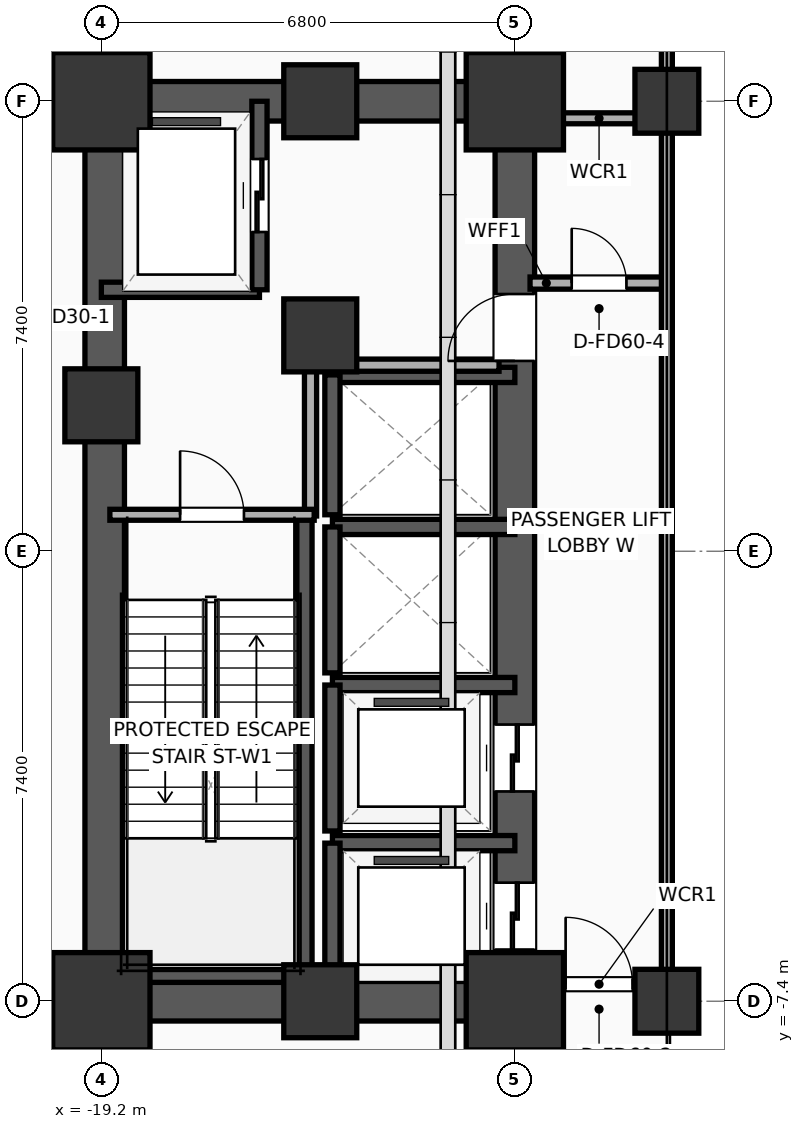
"""IFC4 building model, lengths in metres.
Left out: names, types, materials, properties, quantities, classifications, styles, units other than length and angle.
Written with IfcOpenShell. Run it as: python <this file> out.ifc"""

import sys

from ifc_helpers import new_model, si_unit, direction, frame, frame_2d, origin, origin_2d, place, context, subcontext, project, spatial, rectangle, extrude, element, fill, save


model = new_model("IFC4")
c1 = context("Model", 3, precision=1e-05, world=origin(), true_north=direction((0.0, 1.0)))
c2 = subcontext(c1, "Body", "Model", "MODEL_VIEW")
j1 = project(units=[si_unit("LENGTHUNIT", "METRE"), si_unit("PLANEANGLEUNIT", "RADIAN")], contexts=[c1])
p1 = place(None, origin())
s1 = spatial("IfcSite", under=j1, at=p1, CompositionType="ELEMENT")
p2 = place(p1, origin())
s2 = spatial("IfcBuilding", under=s1, at=p2, CompositionType="ELEMENT")
p3 = place(p2, frame((0.0, 0.0, 10.4)))
s3 = spatial("IfcBuildingStorey", under=s2, at=p3, CompositionType="ELEMENT", Elevation=10.4)
p4 = place(p3, frame((-19.2, -7.4, 0.0), z_axis=(0.0, 0.0, 1.0), x_axis=(1.0, 0.0, 0.0)))
e1 = element("IfcColumn", 1, at=p4, inside=s3, PredefinedType="COLUMN", context=c2, shape_type="SweptSolid", body=[
    extrude(rectangle(XDim=1.6, YDim=1.6, at=origin_2d()), origin(), (0.0, 0.0, 1.0), 5.2),
])
p5 = place(p3, frame((-19.2, 2.4, 0.0), z_axis=(0.0, 0.0, 1.0), x_axis=(1.0, 0.0, 0.0)))
e2 = element("IfcColumn", 2, at=p5, inside=s3, PredefinedType="COLUMN", context=c2, shape_type="SweptSolid", body=[
    extrude(rectangle(XDim=1.2, YDim=1.2, at=origin_2d()), origin(), (0.0, 0.0, 1.0), 5.2),
])
p6 = place(p3, frame((-19.2, 7.4, 0.0), z_axis=(0.0, 0.0, 1.0), x_axis=(1.0, 0.0, 0.0)))
e3 = element("IfcColumn", 3, at=p6, inside=s3, PredefinedType="COLUMN", context=c2, shape_type="SweptSolid", body=[
    extrude(rectangle(XDim=1.6, YDim=1.6, at=origin_2d()), origin(), (0.0, 0.0, 1.0), 5.2),
])
for number, where, z_axis, x_axis in (
    (4, (-15.6, -7.4, 0.0), (0.0, 0.0, 1.0), (1.0, 0.0, 0.0)),
    (5, (-15.6, 7.4, 0.0), (0.0, 0.0, 1.0), (1.0, 0.0, 0.0)),
):
    element("IfcColumn", number, at=place(p3, frame(where, z_axis=z_axis, x_axis=x_axis)), inside=s3, PredefinedType="COLUMN", context=c2, shape_type="SweptSolid", body=[
        extrude(rectangle(XDim=1.2, YDim=1.2, at=origin_2d()), origin(), (0.0, 0.0, 1.0), 5.2),
    ])
p7 = place(p3, frame((-12.4, -7.4, 0.0), z_axis=(0.0, 0.0, 1.0), x_axis=(1.0, 0.0, 0.0)))
e6 = element("IfcColumn", 6, at=p7, inside=s3, PredefinedType="COLUMN", context=c2, shape_type="SweptSolid", body=[
    extrude(rectangle(XDim=1.6, YDim=1.6, at=origin_2d()), origin(), (0.0, 0.0, 1.0), 5.2),
])
p8 = place(p3, frame((-15.6, 3.55, 0.0), z_axis=(0.0, 0.0, 1.0), x_axis=(1.0, 0.0, 0.0)))
e7 = element("IfcColumn", 7, at=p8, inside=s3, PredefinedType="COLUMN", context=c2, shape_type="SweptSolid", body=[
    extrude(rectangle(XDim=1.2, YDim=1.2, at=origin_2d()), origin(), (0.0, 0.0, 1.0), 5.2),
])
p9 = place(p3, frame((-12.4, 7.4, 0.0), z_axis=(0.0, 0.0, 1.0), x_axis=(1.0, 0.0, 0.0)))
e8 = element("IfcColumn", 8, at=p9, inside=s3, PredefinedType="COLUMN", context=c2, shape_type="SweptSolid", body=[
    extrude(rectangle(XDim=1.6, YDim=1.6, at=origin_2d()), origin(), (0.0, 0.0, 1.0), 5.2),
])
for number, where, z_axis, x_axis in (
    (9, (-19.525, -7.4, 0.0), (0.0, 0.0, 1.0), (1.0, 0.0, 0.0)),
    (10, (-19.525, 7.4, 0.0), (0.0, 0.0, 1.0), (1.0, 0.0, 0.0)),
):
    element("IfcWall", number, at=place(p3, frame(where, z_axis=z_axis, x_axis=x_axis)), inside=s3, PredefinedType="SHEAR", context=c2, shape_type="SweptSolid", body=[
        extrude(rectangle(XDim=7.45, YDim=0.65, at=frame_2d((3.725, 0.0))), origin(), (0.0, 0.0, 1.0), 4.92),
    ])
p10 = place(p3, frame((-19.145, -7.4, 0.0), z_axis=(0.0, 0.0, 1.0), x_axis=(0.0, 1.0, 0.0)))
e11 = element("IfcWall", 11, at=p10, inside=s3, PredefinedType="SHEAR", context=c2, shape_type="SweptSolid", body=[
    extrude(rectangle(XDim=14.8, YDim=0.65, at=frame_2d((7.4, 0.0))), origin(), (0.0, 0.0, 1.0), 4.92),
])
p11 = place(p3, frame((-12.4, -7.4, 0.0), z_axis=(0.0, 0.0, 1.0), x_axis=(0.0, 1.0, 0.0)))
e12 = element("IfcWall", 12, at=p11, inside=s3, PredefinedType="SHEAR", context=c2, shape_type="SweptSolid", body=[
    extrude(rectangle(XDim=14.8, YDim=0.65, at=frame_2d((7.4, 0.0))), origin(), (0.0, 0.0, 1.0), 4.92),
])
p12 = place(p11, frame((0.85, 0.0, 0.0)))
e13 = element("IfcOpeningElement", 13, at=p12, cuts=e12, PredefinedType="OPENING", context=c2, shape_type="SweptSolid", body=[
    extrude(rectangle(XDim=1.1, YDim=2.05, at=frame_2d((0.55, 1.025))), frame((0.0, 0.335, 0.0), z_axis=(0.0, -1.0, 0.0), x_axis=(1.0, 0.0, 0.0)), (0.0, 0.0, 1.0), 0.67),
])
p13 = place(p11, frame((3.45, 0.0, 0.0)))
e14 = element("IfcOpeningElement", 14, at=p13, cuts=e12, PredefinedType="OPENING", context=c2, shape_type="SweptSolid", body=[
    extrude(rectangle(XDim=1.1, YDim=2.05, at=frame_2d((0.55, 1.025))), frame((0.0, 0.335, 0.0), z_axis=(0.0, -1.0, 0.0), x_axis=(1.0, 0.0, 0.0)), (0.0, 0.0, 1.0), 0.67),
])
p14 = place(p11, frame((10.53, 0.0, 0.0)))
e15 = element("IfcOpeningElement", 15, at=p14, cuts=e12, PredefinedType="OPENING", context=c2, shape_type="SweptSolid", body=[
    extrude(rectangle(XDim=1.1, YDim=2.05, at=frame_2d((0.55, 1.025))), frame((0.0, 0.335, 0.0), z_axis=(0.0, -1.0, 0.0), x_axis=(1.0, 0.0, 0.0)), (0.0, 0.0, 1.0), 0.67),
])
p15 = place(p3, frame((-15.86, -7.085, 0.0), z_axis=(0.0, 0.0, 1.0), x_axis=(0.0, 1.0, 0.0)))
e16 = element("IfcWall", 16, at=p15, inside=s3, PredefinedType="SOLIDWALL", context=c2, shape_type="SweptSolid", body=[
    extrude(rectangle(XDim=7.685, YDim=0.25, at=frame_2d((3.843, 0.0))), origin(), (0.0, 0.0, 1.0), 4.92),
])
p16 = place(p3, frame((-19.2, -6.965, 0.0), z_axis=(0.0, 0.0, 1.0), x_axis=(1.0, 0.0, 0.0)))
e17 = element("IfcWall", 17, at=p16, inside=s3, PredefinedType="SOLIDWALL", context=c2, shape_type="SweptSolid", body=[
    extrude(rectangle(XDim=3.46, YDim=0.25, at=frame_2d((1.73, 0.0))), origin(), (0.0, 0.0, 1.0), 4.92),
])
for number, where, z_axis, x_axis in (
    (18, (-9.9, -7.4, 0.0), (0.0, 0.0, 1.0), (1.0, 0.0, 0.0)),
    (19, (-9.9, 7.4, 0.0), (0.0, 0.0, 1.0), (1.0, 0.0, 0.0)),
):
    element("IfcColumn", number, at=place(p3, frame(where, z_axis=z_axis, x_axis=x_axis)), inside=s3, PredefinedType="COLUMN", context=c2, shape_type="SweptSolid", body=[
        extrude(rectangle(XDim=1.05, YDim=1.05, at=origin_2d()), origin(), (0.0, 0.0, 1.0), 5.2),
    ])
p17 = place(p3, frame((-19.2, 4.3, 0.0), z_axis=(0.0, 0.0, 1.0), x_axis=(1.0, 0.0, 0.0)))
e20 = element("IfcWall", 20, at=p17, inside=s3, PredefinedType="SOLIDWALL", context=c2, shape_type="SweptSolid", body=[
    extrude(rectangle(XDim=2.6, YDim=0.25, at=frame_2d((1.3, 0.0))), origin(), (0.0, 0.0, 1.0), 4.92),
])
p18 = place(p3, frame((-16.6, 4.3, 0.0), z_axis=(0.0, 0.0, 1.0), x_axis=(0.0, 1.0, 0.0)))
e21 = element("IfcWall", 21, at=p18, inside=s3, PredefinedType="SOLIDWALL", context=c2, shape_type="SweptSolid", body=[
    extrude(rectangle(XDim=3.1, YDim=0.25, at=frame_2d((1.55, 0.0))), origin(), (0.0, 0.0, 1.0), 4.92),
])
p19 = place(p18, frame((0.95, 0.0, 0.0)))
e22 = element("IfcOpeningElement", 22, at=p19, cuts=e21, PredefinedType="OPENING", context=c2, shape_type="SweptSolid", body=[
    extrude(rectangle(XDim=1.2, YDim=2.05, at=frame_2d((0.6, 1.025))), frame((0.0, 0.135, 0.0), z_axis=(0.0, -1.0, 0.0), x_axis=(1.0, 0.0, 0.0)), (0.0, 0.0, 1.0), 0.27),
])
p20 = place(p3, frame((-12.4, -4.8, 0.0), z_axis=(0.0, 0.0, 1.0), x_axis=(-1.0, 0.0, 0.0)))
e23 = element("IfcWall", 23, at=p20, inside=s3, PredefinedType="SOLIDWALL", context=c2, shape_type="SweptSolid", body=[
    extrude(rectangle(XDim=3.0, YDim=0.25, at=frame_2d((1.5, 0.0))), origin(), (0.0, 0.0, 1.0), 4.92),
])
p21 = place(p3, frame((-15.4, -4.8, 0.0), z_axis=(0.0, 0.0, 1.0), x_axis=(0.0, -1.0, 0.0)))
e24 = element("IfcWall", 24, at=p21, inside=s3, PredefinedType="SOLIDWALL", context=c2, shape_type="SweptSolid", body=[
    extrude(rectangle(XDim=2.6, YDim=0.25, at=frame_2d((1.3, 0.0))), origin(), (0.0, 0.0, 1.0), 4.92),
])
p22 = place(p3, frame((-12.4, -2.2, 0.0), z_axis=(0.0, 0.0, 1.0), x_axis=(-1.0, 0.0, 0.0)))
e25 = element("IfcWall", 25, at=p22, inside=s3, PredefinedType="SOLIDWALL", context=c2, shape_type="SweptSolid", body=[
    extrude(rectangle(XDim=3.0, YDim=0.25, at=frame_2d((1.5, 0.0))), origin(), (0.0, 0.0, 1.0), 4.92),
])
p23 = place(p3, frame((-15.4, -2.2, 0.0), z_axis=(0.0, 0.0, 1.0), x_axis=(0.0, -1.0, 0.0)))
e26 = element("IfcWall", 26, at=p23, inside=s3, PredefinedType="SOLIDWALL", context=c2, shape_type="SweptSolid", body=[
    extrude(rectangle(XDim=2.4, YDim=0.25, at=frame_2d((1.2, 0.0))), origin(), (0.0, 0.0, 1.0), 4.92),
])
p24 = place(p3, frame((-12.4, 0.4, 0.0), z_axis=(0.0, 0.0, 1.0), x_axis=(-1.0, 0.0, 0.0)))
e27 = element("IfcWall", 27, at=p24, inside=s3, PredefinedType="SOLIDWALL", context=c2, shape_type="SweptSolid", body=[
    extrude(rectangle(XDim=3.0, YDim=0.25, at=frame_2d((1.5, 0.0))), origin(), (0.0, 0.0, 1.0), 4.92),
])
p25 = place(p3, frame((-15.4, 0.4, 0.0), z_axis=(0.0, 0.0, 1.0), x_axis=(0.0, -1.0, 0.0)))
e28 = element("IfcWall", 28, at=p25, inside=s3, PredefinedType="SOLIDWALL", context=c2, shape_type="SweptSolid", body=[
    extrude(rectangle(XDim=2.4, YDim=0.25, at=frame_2d((1.2, 0.0))), origin(), (0.0, 0.0, 1.0), 4.92),
])
p26 = place(p3, frame((-12.4, 2.9, 0.0), z_axis=(0.0, 0.0, 1.0), x_axis=(-1.0, 0.0, 0.0)))
e29 = element("IfcWall", 29, at=p26, inside=s3, PredefinedType="SOLIDWALL", context=c2, shape_type="SweptSolid", body=[
    extrude(rectangle(XDim=3.0, YDim=0.25, at=frame_2d((1.5, 0.0))), origin(), (0.0, 0.0, 1.0), 4.92),
])
p27 = place(p3, frame((-15.4, 2.9, 0.0), z_axis=(0.0, 0.0, 1.0), x_axis=(0.0, -1.0, 0.0)))
e30 = element("IfcWall", 30, at=p27, inside=s3, PredefinedType="SOLIDWALL", context=c2, shape_type="SweptSolid", body=[
    extrude(rectangle(XDim=2.3, YDim=0.25, at=frame_2d((1.15, 0.0))), origin(), (0.0, 0.0, 1.0), 4.92),
])
p28 = place(p3, frame((-15.76, 0.58, 0.0), z_axis=(0.0, 0.0, 1.0), x_axis=(0.0, 1.0, 0.0)))
e31 = element("IfcWall", 31, at=p28, inside=s3, PredefinedType="PARTITIONING", context=c2, shape_type="SweptSolid", body=[
    extrude(rectangle(XDim=2.52, YDim=0.2, at=frame_2d((1.26, 0.0))), origin(), (0.0, 0.0, 1.0), 4.92),
])
p29 = place(p3, frame((-15.82, 3.06, 0.0), z_axis=(0.0, 0.0, 1.0), x_axis=(1.0, 0.0, 0.0)))
e32 = element("IfcWall", 32, at=p29, inside=s3, PredefinedType="PARTITIONING", context=c2, shape_type="SweptSolid", body=[
    extrude(rectangle(XDim=3.16, YDim=0.2, at=frame_2d((1.58, 0.0))), origin(), (0.0, 0.0, 1.0), 4.92),
])
p30 = place(p3, frame((-19.06, 0.6, 0.0), z_axis=(0.0, 0.0, 1.0), x_axis=(1.0, 0.0, 0.0)))
e33 = element("IfcWall", 33, at=p30, inside=s3, PredefinedType="PARTITIONING", context=c2, shape_type="SweptSolid", body=[
    extrude(rectangle(XDim=3.36, YDim=0.18, at=frame_2d((1.68, 0.0))), origin(), (0.0, 0.0, 1.0), 4.92),
])
p31 = place(p30, frame((1.155, 0.0, 0.0)))
e34 = element("IfcOpeningElement", 34, at=p31, cuts=e33, PredefinedType="OPENING", context=c2, shape_type="SweptSolid", body=[
    extrude(rectangle(XDim=1.05, YDim=2.05, at=frame_2d((0.525, 1.025))), frame((0.0, 0.1, 0.0), z_axis=(0.0, -1.0, 0.0), x_axis=(1.0, 0.0, 0.0)), (0.0, 0.0, 1.0), 0.2),
])
p32 = place(p3, frame((-12.15, 4.41, 0.0), z_axis=(0.0, 0.0, 1.0), x_axis=(1.0, 0.0, 0.0)))
e35 = element("IfcWall", 35, at=p32, inside=s3, PredefinedType="PARTITIONING", context=c2, shape_type="SweptSolid", body=[
    extrude(rectangle(XDim=2.27, YDim=0.2, at=frame_2d((1.135, 0.0))), origin(), (0.0, 0.0, 1.0), 4.92),
])
p33 = place(p32, frame((0.685, 0.0, 0.0)))
e36 = element("IfcOpeningElement", 36, at=p33, cuts=e35, PredefinedType="OPENING", context=c2, shape_type="SweptSolid", body=[
    extrude(rectangle(XDim=0.9, YDim=2.05, at=frame_2d((0.45, 1.025))), frame((0.0, 0.11, 0.0), z_axis=(0.0, -1.0, 0.0), x_axis=(1.0, 0.0, 0.0)), (0.0, 0.0, 1.0), 0.22),
])
p34 = place(p3, frame((-12.15, 7.12, 0.0), z_axis=(0.0, 0.0, 1.0), x_axis=(1.0, 0.0, 0.0)))
e37 = element("IfcWall", 37, at=p34, inside=s3, PredefinedType="PARTITIONING", context=c2, shape_type="SweptSolid", body=[
    extrude(rectangle(XDim=2.27, YDim=0.18, at=frame_2d((1.135, 0.0))), origin(), (0.0, 0.0, 1.0), 4.21),
])
p35 = place(p3, frame((-12.15, -7.12, 0.0), z_axis=(0.0, 0.0, 1.0), x_axis=(1.0, 0.0, 0.0)))
e38 = element("IfcWall", 38, at=p35, inside=s3, PredefinedType="PARTITIONING", context=c2, shape_type="SweptSolid", body=[
    extrude(rectangle(XDim=2.27, YDim=0.18, at=frame_2d((1.135, 0.0))), origin(), (0.0, 0.0, 1.0), 4.21),
])
p36 = place(p35, frame((0.585, 0.0, 0.0)))
e39 = element("IfcOpeningElement", 39, at=p36, cuts=e38, PredefinedType="OPENING", context=c2, shape_type="SweptSolid", body=[
    extrude(rectangle(XDim=1.1, YDim=2.05, at=frame_2d((0.55, 1.025))), frame((0.0, 0.1, 0.0), z_axis=(0.0, -1.0, 0.0), x_axis=(1.0, 0.0, 0.0)), (0.0, 0.0, 1.0), 0.2),
])
p37 = place(p3, frame((-9.9, -7.12, 0.0), z_axis=(0.0, 0.0, 1.0), x_axis=(0.0, 1.0, 0.0)))
e40 = element("IfcWall", 40, at=p37, inside=s3, PredefinedType="PARTITIONING", context=c2, shape_type="SweptSolid", body=[
    extrude(rectangle(XDim=16.82, YDim=0.18, at=frame_2d((8.41, 0.0))), origin(), (0.0, 0.0, 1.0), 4.21),
])
p38 = place(p19, origin())
e41 = element("IfcDoor", 41, at=p38, inside=s3, OperationType="SLIDING_TO_LEFT", PredefinedType="DOOR", context=c2, shape_type="SweptSolid", body=[
    extrude(rectangle(XDim=1.2, YDim=2.05, at=frame_2d((0.6, 1.025))), frame((0.0, 0.025, 0.0), z_axis=(0.0, -1.0, 0.0), x_axis=(1.0, 0.0, 0.0)), (0.0, 0.0, 1.0), 0.05),
])
fill(e22, e41)
p39 = place(p12, origin())
e42 = element("IfcDoor", 42, at=p39, inside=s3, OperationType="SLIDING_TO_LEFT", PredefinedType="DOOR", context=c2, shape_type="SweptSolid", body=[
    extrude(rectangle(XDim=1.1, YDim=2.05, at=frame_2d((0.55, 1.025))), frame((0.0, 0.025, 0.0), z_axis=(0.0, -1.0, 0.0), x_axis=(1.0, 0.0, 0.0)), (0.0, 0.0, 1.0), 0.05),
])
fill(e13, e42)
p40 = place(p13, origin())
e43 = element("IfcDoor", 43, at=p40, inside=s3, OperationType="SLIDING_TO_LEFT", PredefinedType="DOOR", context=c2, shape_type="SweptSolid", body=[
    extrude(rectangle(XDim=1.1, YDim=2.05, at=frame_2d((0.55, 1.025))), frame((0.0, 0.025, 0.0), z_axis=(0.0, -1.0, 0.0), x_axis=(1.0, 0.0, 0.0)), (0.0, 0.0, 1.0), 0.05),
])
fill(e14, e43)
p41 = place(p31, origin())
e44 = element("IfcDoor", 44, at=p41, inside=s3, OperationType="SINGLE_SWING_LEFT", PredefinedType="DOOR", context=c2, shape_type="SweptSolid", body=[
    extrude(rectangle(XDim=1.05, YDim=2.05, at=frame_2d((0.525, 1.025))), frame((0.0, 0.025, 0.0), z_axis=(0.0, -1.0, 0.0), x_axis=(1.0, 0.0, 0.0)), (0.0, 0.0, 1.0), 0.05),
])
fill(e34, e44)
p42 = place(p33, origin())
e45 = element("IfcDoor", 45, at=p42, inside=s3, OperationType="SINGLE_SWING_LEFT", PredefinedType="DOOR", context=c2, shape_type="SweptSolid", body=[
    extrude(rectangle(XDim=0.9, YDim=2.05, at=frame_2d((0.45, 1.025))), frame((0.0, 0.025, 0.0), z_axis=(0.0, -1.0, 0.0), x_axis=(1.0, 0.0, 0.0)), (0.0, 0.0, 1.0), 0.05),
])
fill(e36, e45)
p43 = place(p36, origin())
e46 = element("IfcDoor", 46, at=p43, inside=s3, OperationType="SINGLE_SWING_LEFT", PredefinedType="DOOR", context=c2, shape_type="SweptSolid", body=[
    extrude(rectangle(XDim=1.1, YDim=2.05, at=frame_2d((0.55, 1.025))), frame((0.0, 0.025, 0.0), z_axis=(0.0, -1.0, 0.0), x_axis=(1.0, 0.0, 0.0)), (0.0, 0.0, 1.0), 0.05),
])
fill(e39, e46)
p44 = place(p14, origin())
e47 = element("IfcDoor", 47, at=p44, inside=s3, OperationType="SINGLE_SWING_LEFT", PredefinedType="DOOR", context=c2, shape_type="SweptSolid", body=[
    extrude(rectangle(XDim=1.1, YDim=2.05, at=frame_2d((0.55, 1.025))), frame((0.0, 0.025, 0.0), z_axis=(0.0, -1.0, 0.0), x_axis=(1.0, 0.0, 0.0)), (0.0, 0.0, 1.0), 0.05),
])
fill(e15, e47)
save(model, sys.argv[1])
